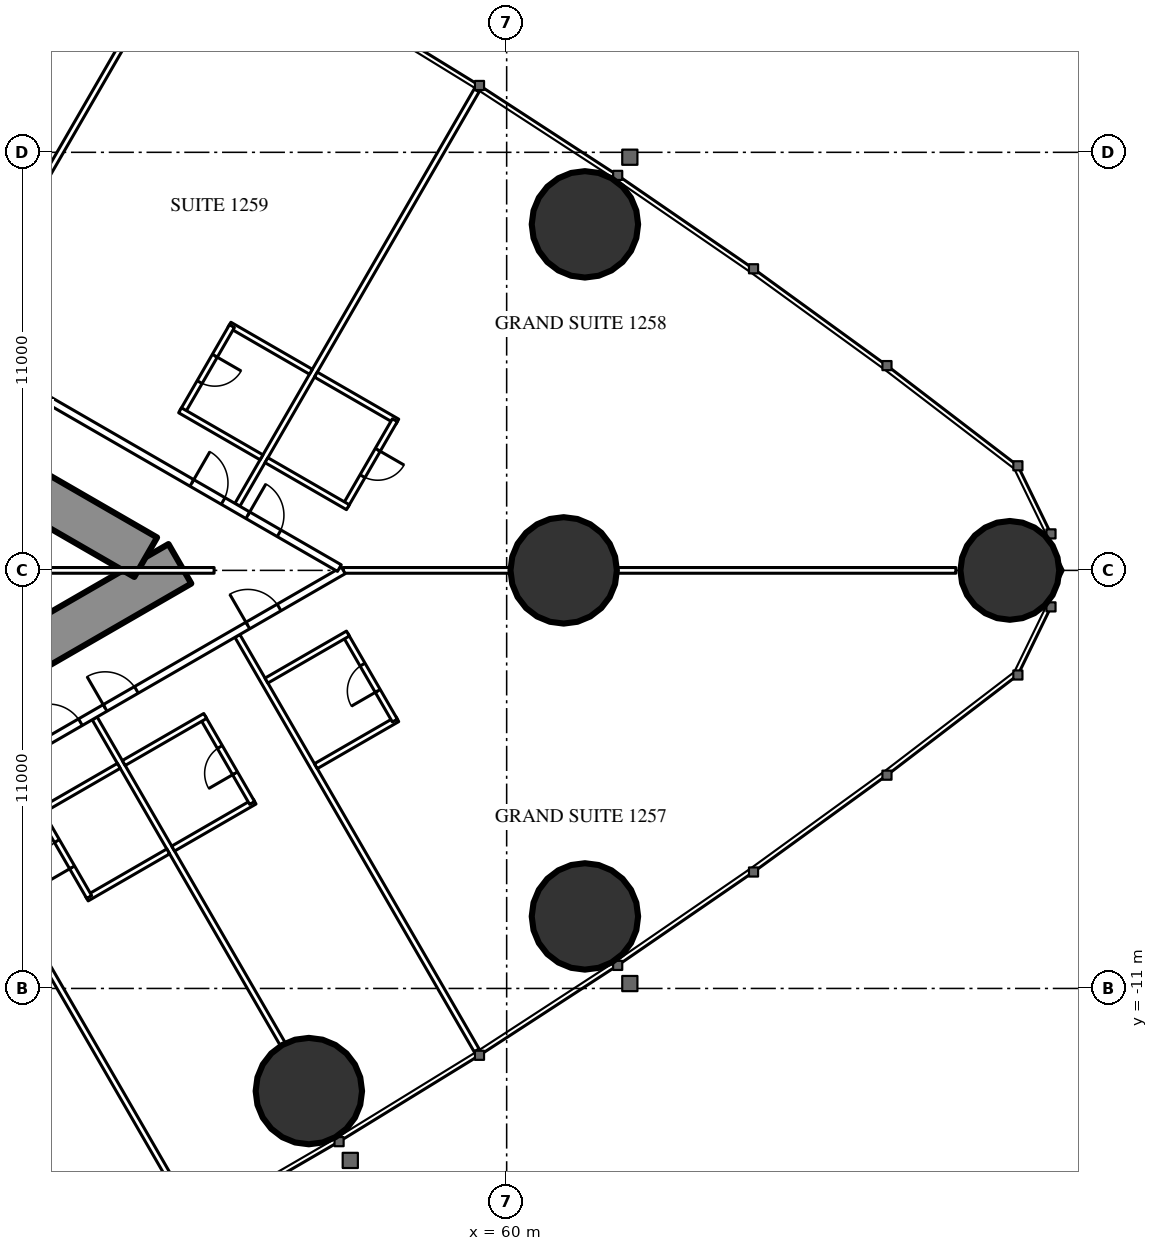
"""IFC4 building model, lengths in metres.
Left out: names, types, materials, properties, quantities, classifications, styles, units other than length and angle.
Written with IfcOpenShell. Run it as: python <this file> out.ifc"""

import sys

from ifc_helpers import new_model, si_unit, direction, frame, frame_2d, origin, origin_2d, place, context, subcontext, project, spatial, rectangle, hollow_circle, extrude, element, fill, save


model = new_model("IFC4")
c1 = context("Model", 3, precision=1e-05, world=origin(), true_north=direction((0.0, 1.0)))
c2 = subcontext(c1, "Body", "Model", "MODEL_VIEW")
j1 = project(units=[si_unit("LENGTHUNIT", "METRE"), si_unit("PLANEANGLEUNIT", "RADIAN")], contexts=[c1])
p1 = place(None, origin())
s1 = spatial("IfcSite", under=j1, at=p1, CompositionType="ELEMENT")
p2 = place(p1, origin())
s2 = spatial("IfcBuilding", under=s1, at=p2, CompositionType="ELEMENT")
p3 = place(p2, frame((0.0, 0.0, 49.5)))
s3 = spatial("IfcBuildingStorey", under=s2, at=p3, CompositionType="ELEMENT", Elevation=49.5)
p4 = place(p3, frame((73.239, 0.0, 0.0), z_axis=(0.0, 0.0, 1.0), x_axis=(1.0, 0.0, 0.0)))
e1 = element("IfcColumn", 1, at=p4, inside=s3, PredefinedType="COLUMN", context=c2, shape_type="SweptSolid", body=[
    extrude(hollow_circle(Radius=1.3, WallThickness=0.1, at=origin_2d()), origin(), (0.0, 0.0, 1.0), 3.5),
])
for number, where, z_axis, x_axis in (
    (2, (62.059, 9.105, 0.0), (0.0, 0.0, 1.0), (1.0, 0.0, 0.0)),
    (3, (54.795, -13.701, 0.0), (0.0, 0.0, 1.0), (1.0, 0.0, 0.0)),
    (4, (62.059, -9.105, 0.0), (0.0, 0.0, 1.0), (1.0, 0.0, 0.0)),
):
    element("IfcColumn", number, at=place(p3, frame(where, z_axis=z_axis, x_axis=x_axis)), inside=s3, PredefinedType="COLUMN", context=c2, shape_type="SweptSolid", body=[
        extrude(hollow_circle(Radius=1.4, WallThickness=0.12, at=origin_2d()), origin(), (0.0, 0.0, 1.0), 3.5),
    ])
p5 = place(p3, frame((61.5, 0.0, 0.0), z_axis=(0.0, 0.0, 1.0), x_axis=(1.0, 0.0, 0.0)))
e5 = element("IfcColumn", 5, at=p5, inside=s3, PredefinedType="COLUMN", context=c2, shape_type="SweptSolid", body=[
    extrude(hollow_circle(Radius=1.4, WallThickness=0.1, at=origin_2d()), origin(), (0.0, 0.0, 1.0), 3.5),
])
p6 = place(p3, frame((27.2, -13.8, 0.0), z_axis=(0.0, 0.0, 1.0), x_axis=(0.866027159892, 0.499996958321, 0.0)))
e6 = element("IfcWall", 6, at=p6, inside=s3, PredefinedType="SHEAR", context=c2, shape_type="SweptSolid", body=[
    extrude(rectangle(XDim=27.947, YDim=1.2, at=frame_2d((13.973, 0.0))), origin(), (0.0, 0.0, 1.0), 3.5),
])
p7 = place(p6, frame((4.6, 0.0, 0.0)))
e7 = element("IfcOpeningElement", 7, at=p7, cuts=e6, PredefinedType="OPENING", context=c2, shape_type="SweptSolid", body=[
    extrude(rectangle(XDim=1.0, YDim=2.2, at=frame_2d((0.5, 1.1))), frame((0.0, 0.61, 0.0), z_axis=(0.0, -1.0, 0.0), x_axis=(1.0, 0.0, 0.0)), (0.0, 0.0, 1.0), 1.22),
])
p8 = place(p6, frame((13.395, 0.0, 0.0)))
e8 = element("IfcOpeningElement", 8, at=p8, cuts=e6, PredefinedType="OPENING", context=c2, shape_type="SweptSolid", body=[
    extrude(rectangle(XDim=1.8, YDim=2.2, at=frame_2d((0.9, 1.1))), frame((0.0, 0.61, 0.0), z_axis=(0.0, -1.0, 0.0), x_axis=(1.0, 0.0, 0.0)), (0.0, 0.0, 1.0), 1.22),
])
p9 = place(p3, frame((27.2, 13.8, 0.0), z_axis=(0.0, 0.0, 1.0), x_axis=(0.866024515034, -0.500001539357, 0.0)))
e9 = element("IfcWall", 9, at=p9, inside=s3, PredefinedType="SHEAR", context=c2, shape_type="SweptSolid", body=[
    extrude(rectangle(XDim=26.907, YDim=1.2, at=frame_2d((13.454, 0.0))), origin(), (0.0, 0.0, 1.0), 3.5),
])
p10 = place(p9, frame((4.6, 0.0, 0.0)))
e10 = element("IfcOpeningElement", 10, at=p10, cuts=e9, PredefinedType="OPENING", context=c2, shape_type="SweptSolid", body=[
    extrude(rectangle(XDim=1.0, YDim=2.2, at=frame_2d((0.5, 1.1))), frame((0.0, 0.61, 0.0), z_axis=(0.0, -1.0, 0.0), x_axis=(1.0, 0.0, 0.0)), (0.0, 0.0, 1.0), 1.22),
])
p11 = place(p9, frame((13.395, 0.0, 0.0)))
e11 = element("IfcOpeningElement", 11, at=p11, cuts=e9, PredefinedType="OPENING", context=c2, shape_type="SweptSolid", body=[
    extrude(rectangle(XDim=1.8, YDim=2.2, at=frame_2d((0.9, 1.1))), frame((0.0, 0.61, 0.0), z_axis=(0.0, -1.0, 0.0), x_axis=(1.0, 0.0, 0.0)), (0.0, 0.0, 1.0), 1.22),
])
p12 = place(p3, frame((45.403, -6.062, 0.0), z_axis=(0.0, 0.0, 1.0), x_axis=(0.500007077968, -0.866021317279, 0.0)))
e12 = element("IfcWall", 12, at=p12, inside=s3, PredefinedType="PARTITIONING", context=c2, shape_type="SweptSolid", body=[
    extrude(rectangle(XDim=12.721, YDim=0.15, at=frame_2d((6.361, 0.0))), origin(), (0.0, 0.0, 1.0), 3.25),
])
p13 = place(p3, frame((49.159, -3.893, 0.0), z_axis=(0.0, 0.0, 1.0), x_axis=(0.499998773722, -0.866026111775, 0.0)))
e13 = element("IfcWall", 13, at=p13, inside=s3, PredefinedType="PARTITIONING", context=c2, shape_type="SweptSolid", body=[
    extrude(rectangle(XDim=9.892, YDim=0.15, at=frame_2d((4.946, 0.0))), origin(), (0.0, 0.0, 1.0), 2.25),
])
p14 = place(p3, frame((52.915, -1.725, 0.0), z_axis=(0.0, 0.0, 1.0), x_axis=(0.499997163113, -0.866027041656, 0.0)))
e14 = element("IfcWall", 14, at=p14, inside=s3, PredefinedType="PARTITIONING", context=c2, shape_type="SweptSolid", body=[
    extrude(rectangle(XDim=12.591, YDim=0.15, at=frame_2d((6.295, 0.0))), origin(), (0.0, 0.0, 1.0), 3.25),
])
p15 = place(p3, frame((45.403, 6.062, 0.0), z_axis=(0.0, 0.0, 1.0), x_axis=(0.500013434677, 0.866017647131, 0.0)))
e15 = element("IfcWall", 15, at=p15, inside=s3, PredefinedType="PARTITIONING", context=c2, shape_type="SweptSolid", body=[
    extrude(rectangle(XDim=9.902, YDim=0.15, at=frame_2d((4.951, 0.0))), origin(), (0.0, 0.0, 1.0), 2.25),
])
p16 = place(p3, frame((52.915, 1.725, 0.0), z_axis=(0.0, 0.0, 1.0), x_axis=(0.499997163113, 0.866027041656, 0.0)))
e16 = element("IfcWall", 16, at=p16, inside=s3, PredefinedType="PARTITIONING", context=c2, shape_type="SweptSolid", body=[
    extrude(rectangle(XDim=12.591, YDim=0.15, at=frame_2d((6.295, 0.0))), origin(), (0.0, 0.0, 1.0), 3.25),
])
p17 = place(p3, frame((55.702, 0.0, 0.0), z_axis=(0.0, 0.0, 1.0), x_axis=(1.0, 0.0, 0.0)))
e17 = element("IfcWall", 17, at=p17, inside=s3, PredefinedType="PARTITIONING", context=c2, shape_type="SweptSolid", body=[
    extrude(rectangle(XDim=16.117, YDim=0.15, at=frame_2d((8.059, 0.0))), origin(), (0.0, 0.0, 1.0), 2.25),
])
p18 = place(p3, frame((37.96, -10.243, 0.0), z_axis=(0.0, 0.0, 1.0), x_axis=(0.866026429433, 0.499998223521, 0.0)))
e18 = element("IfcWall", 18, at=p18, inside=s3, PredefinedType="PARTITIONING", context=c2, shape_type="SweptSolid", body=[
    extrude(rectangle(XDim=20.487, YDim=0.2, at=frame_2d((10.243, 0.0))), origin(), (0.0, 0.0, 1.0), 3.25),
])
p19 = place(p18, frame((6.925, 0.0, 0.0)))
e19 = element("IfcOpeningElement", 19, at=p19, cuts=e18, PredefinedType="OPENING", context=c2, shape_type="SweptSolid", body=[
    extrude(rectangle(XDim=0.95, YDim=2.2, at=frame_2d((0.475, 1.1))), frame((0.0, 0.11, 0.0), z_axis=(0.0, -1.0, 0.0), x_axis=(1.0, 0.0, 0.0)), (0.0, 0.0, 1.0), 0.22),
])
p20 = place(p18, frame((11.549, 0.0, 0.0)))
e20 = element("IfcOpeningElement", 20, at=p20, cuts=e18, PredefinedType="OPENING", context=c2, shape_type="SweptSolid", body=[
    extrude(rectangle(XDim=0.95, YDim=2.2, at=frame_2d((0.475, 1.1))), frame((0.0, 0.11, 0.0), z_axis=(0.0, -1.0, 0.0), x_axis=(1.0, 0.0, 0.0)), (0.0, 0.0, 1.0), 0.22),
])
p21 = place(p18, frame((13.249, 0.0, 0.0)))
e21 = element("IfcOpeningElement", 21, at=p21, cuts=e18, PredefinedType="OPENING", context=c2, shape_type="SweptSolid", body=[
    extrude(rectangle(XDim=0.95, YDim=2.2, at=frame_2d((0.475, 1.1))), frame((0.0, 0.11, 0.0), z_axis=(0.0, -1.0, 0.0), x_axis=(1.0, 0.0, 0.0)), (0.0, 0.0, 1.0), 0.22),
])
p22 = place(p18, frame((17.585, 0.0, 0.0)))
e22 = element("IfcOpeningElement", 22, at=p22, cuts=e18, PredefinedType="OPENING", context=c2, shape_type="SweptSolid", body=[
    extrude(rectangle(XDim=0.95, YDim=2.2, at=frame_2d((0.475, 1.1))), frame((0.0, 0.11, 0.0), z_axis=(0.0, -1.0, 0.0), x_axis=(1.0, 0.0, 0.0)), (0.0, 0.0, 1.0), 0.22),
])
p23 = place(p18, frame((0.6, 0.0, 0.0)))
e23 = element("IfcOpeningElement", 23, at=p23, cuts=e18, PredefinedType="OPENING", context=c2, shape_type="SweptSolid", body=[
    extrude(rectangle(XDim=0.95, YDim=2.2, at=frame_2d((0.475, 1.1))), frame((0.0, 0.11, 0.0), z_axis=(0.0, -1.0, 0.0), x_axis=(1.0, 0.0, 0.0)), (0.0, 0.0, 1.0), 0.22),
])
p24 = place(p3, frame((45.375, 5.963, 0.0), z_axis=(0.0, 0.0, 1.0), x_axis=(0.86603164725, -0.499989185844, 0.0)))
e24 = element("IfcWall", 24, at=p24, inside=s3, PredefinedType="PARTITIONING", context=c2, shape_type="SweptSolid", body=[
    extrude(rectangle(XDim=11.805, YDim=0.2, at=frame_2d((5.903, 0.0))), origin(), (0.0, 0.0, 1.0), 3.25),
])
p25 = place(p24, frame((9.024, 0.0, 0.0)))
e25 = element("IfcOpeningElement", 25, at=p25, cuts=e24, PredefinedType="OPENING", context=c2, shape_type="SweptSolid", body=[
    extrude(rectangle(XDim=0.95, YDim=2.2, at=frame_2d((0.475, 1.1))), frame((0.0, 0.11, 0.0), z_axis=(0.0, -1.0, 0.0), x_axis=(1.0, 0.0, 0.0)), (0.0, 0.0, 1.0), 0.22),
])
p26 = place(p24, frame((7.324, 0.0, 0.0)))
e26 = element("IfcOpeningElement", 26, at=p26, cuts=e24, PredefinedType="OPENING", context=c2, shape_type="SweptSolid", body=[
    extrude(rectangle(XDim=0.95, YDim=2.2, at=frame_2d((0.475, 1.1))), frame((0.0, 0.11, 0.0), z_axis=(0.0, -1.0, 0.0), x_axis=(1.0, 0.0, 0.0)), (0.0, 0.0, 1.0), 0.22),
])
p27 = place(p3, frame((48.951, -8.632, 0.0), z_axis=(0.0, 0.0, 1.0), x_axis=(0.866006523861, 0.500032699561, 0.0)))
e27 = element("IfcWall", 27, at=p27, inside=s3, PredefinedType="PARTITIONING", context=c2, shape_type="SweptSolid", body=[
    extrude(rectangle(XDim=2.475, YDim=0.15, at=frame_2d((1.237, 0.0))), origin(), (0.0, 0.0, 1.0), 3.25),
])
p28 = place(p3, frame((47.716, -6.343, 0.0), z_axis=(0.0, 0.0, 1.0), x_axis=(0.500006934395, -0.866021400173, 0.0)))
e28 = element("IfcWall", 28, at=p28, inside=s3, PredefinedType="PARTITIONING", context=c2, shape_type="SweptSolid", body=[
    extrude(rectangle(XDim=2.6, YDim=0.15, at=frame_2d((1.3, 0.0))), origin(), (0.0, 0.0, 1.0), 3.25),
])
p29 = place(p28, frame((0.9, 0.0, 0.0)))
e29 = element("IfcOpeningElement", 29, at=p29, cuts=e28, PredefinedType="OPENING", context=c2, shape_type="SweptSolid", body=[
    extrude(rectangle(XDim=0.8, YDim=2.2, at=frame_2d((0.4, 1.1))), frame((0.0, 0.085, 0.0), z_axis=(0.0, -1.0, 0.0), x_axis=(1.0, 0.0, 0.0)), (0.0, 0.0, 1.0), 0.17),
])
for number, where, z_axis, x_axis in (
    (30, (47.651, -6.38, 0.0), (0.0, 0.0, 1.0), (0.866, 0.5, 0.0)),
    (31, (51.224, -7.32, 0.0), (0.0, 0.0, 1.0), (0.866, 0.5, 0.0)),
):
    element("IfcWall", number, at=place(p3, frame(where, z_axis=z_axis, x_axis=x_axis)), inside=s3, PredefinedType="PARTITIONING", context=c2, shape_type="SweptSolid", body=[
        extrude(rectangle(XDim=2.475, YDim=0.15, at=frame_2d((1.238, 0.0))), origin(), (0.0, 0.0, 1.0), 3.25),
    ])
p30 = place(p3, frame((52.003, -3.868, 0.0), z_axis=(0.0, 0.0, 1.0), x_axis=(0.500047596559, -0.865997922154, 0.0)))
e32 = element("IfcWall", 32, at=p30, inside=s3, PredefinedType="PARTITIONING", context=c2, shape_type="SweptSolid", body=[
    extrude(rectangle(XDim=2.6, YDim=0.15, at=frame_2d((1.3, 0.0))), origin(), (0.0, 0.0, 1.0), 3.25),
])
p31 = place(p30, frame((0.9, 0.0, 0.0)))
e33 = element("IfcOpeningElement", 33, at=p31, cuts=e32, PredefinedType="OPENING", context=c2, shape_type="SweptSolid", body=[
    extrude(rectangle(XDim=0.8, YDim=2.2, at=frame_2d((0.4, 1.1))), frame((0.0, 0.085, 0.0), z_axis=(0.0, -1.0, 0.0), x_axis=(1.0, 0.0, 0.0)), (0.0, 0.0, 1.0), 0.17),
])
for number, where, z_axis, x_axis in (
    (34, (49.925, -5.068, 0.0), (0.0, 0.0, 1.0), (0.866, 0.5, 0.0)),
    (35, (54.98, -5.151, 0.0), (0.0, 0.0, 1.0), (0.866, 0.5, 0.0)),
):
    element("IfcWall", number, at=place(p3, frame(where, z_axis=z_axis, x_axis=x_axis)), inside=s3, PredefinedType="PARTITIONING", context=c2, shape_type="SweptSolid", body=[
        extrude(rectangle(XDim=2.475, YDim=0.15, at=frame_2d((1.237, 0.0))), origin(), (0.0, 0.0, 1.0), 3.25),
    ])
p32 = place(p3, frame((55.758, -1.7, 0.0), z_axis=(0.0, 0.0, 1.0), x_axis=(0.500006934395, -0.866021400173, 0.0)))
e36 = element("IfcWall", 36, at=p32, inside=s3, PredefinedType="PARTITIONING", context=c2, shape_type="SweptSolid", body=[
    extrude(rectangle(XDim=2.6, YDim=0.15, at=frame_2d((1.3, 0.0))), origin(), (0.0, 0.0, 1.0), 3.25),
])
p33 = place(p32, frame((0.9, 0.0, 0.0)))
e37 = element("IfcOpeningElement", 37, at=p33, cuts=e36, PredefinedType="OPENING", context=c2, shape_type="SweptSolid", body=[
    extrude(rectangle(XDim=0.8, YDim=2.2, at=frame_2d((0.4, 1.1))), frame((0.0, 0.085, 0.0), z_axis=(0.0, -1.0, 0.0), x_axis=(1.0, 0.0, 0.0)), (0.0, 0.0, 1.0), 0.17),
])
for number, where, z_axis, x_axis in (
    (38, (53.68, -2.9, 0.0), (0.0, 0.0, 1.0), (0.866, 0.5, 0.0)),
    (39, (54.98, 5.151, 0.0), (0.0, 0.0, 1.0), (0.866, -0.5, 0.0)),
):
    element("IfcWall", number, at=place(p3, frame(where, z_axis=z_axis, x_axis=x_axis)), inside=s3, PredefinedType="PARTITIONING", context=c2, shape_type="SweptSolid", body=[
        extrude(rectangle(XDim=2.475, YDim=0.15, at=frame_2d((1.237, 0.0))), origin(), (0.0, 0.0, 1.0), 3.25),
    ])
p34 = place(p3, frame((55.758, 1.7, 0.0), z_axis=(0.0, 0.0, 1.0), x_axis=(0.500006934395, 0.866021400173, 0.0)))
e40 = element("IfcWall", 40, at=p34, inside=s3, PredefinedType="PARTITIONING", context=c2, shape_type="SweptSolid", body=[
    extrude(rectangle(XDim=2.6, YDim=0.15, at=frame_2d((1.3, 0.0))), origin(), (0.0, 0.0, 1.0), 3.25),
])
p35 = place(p34, frame((0.9, 0.0, 0.0)))
e41 = element("IfcOpeningElement", 41, at=p35, cuts=e40, PredefinedType="OPENING", context=c2, shape_type="SweptSolid", body=[
    extrude(rectangle(XDim=0.8, YDim=2.2, at=frame_2d((0.4, 1.1))), frame((0.0, 0.085, 0.0), z_axis=(0.0, -1.0, 0.0), x_axis=(1.0, 0.0, 0.0)), (0.0, 0.0, 1.0), 0.17),
])
for number, where, z_axis, x_axis in (
    (42, (53.68, 2.9, 0.0), (0.0, 0.0, 1.0), (0.866, -0.5, 0.0)),
    (43, (52.706, 6.464, 0.0), (0.0, 0.0, 1.0), (0.866, -0.5, 0.0)),
):
    element("IfcWall", number, at=place(p3, frame(where, z_axis=z_axis, x_axis=x_axis)), inside=s3, PredefinedType="PARTITIONING", context=c2, shape_type="SweptSolid", body=[
        extrude(rectangle(XDim=2.475, YDim=0.15, at=frame_2d((1.237, 0.0))), origin(), (0.0, 0.0, 1.0), 3.25),
    ])
p36 = place(p3, frame((51.471, 4.175, 0.0), z_axis=(0.0, 0.0, 1.0), x_axis=(0.500006934395, 0.866021400173, 0.0)))
e44 = element("IfcWall", 44, at=p36, inside=s3, PredefinedType="PARTITIONING", context=c2, shape_type="SweptSolid", body=[
    extrude(rectangle(XDim=2.6, YDim=0.15, at=frame_2d((1.3, 0.0))), origin(), (0.0, 0.0, 1.0), 3.25),
])
p37 = place(p36, frame((0.9, 0.0, 0.0)))
e45 = element("IfcOpeningElement", 45, at=p37, cuts=e44, PredefinedType="OPENING", context=c2, shape_type="SweptSolid", body=[
    extrude(rectangle(XDim=0.8, YDim=2.2, at=frame_2d((0.4, 1.1))), frame((0.0, 0.085, 0.0), z_axis=(0.0, -1.0, 0.0), x_axis=(1.0, 0.0, 0.0)), (0.0, 0.0, 1.0), 0.17),
])
p38 = place(p3, frame((51.406, 4.212, 0.0), z_axis=(0.0, 0.0, 1.0), x_axis=(0.866031185235, -0.4999899861, 0.0)))
e46 = element("IfcWall", 46, at=p38, inside=s3, PredefinedType="PARTITIONING", context=c2, shape_type="SweptSolid", body=[
    extrude(rectangle(XDim=2.475, YDim=0.15, at=frame_2d((1.238, 0.0))), origin(), (0.0, 0.0, 1.0), 3.25),
])
p39 = place(p3, frame((44.575, 0.0, 0.0), z_axis=(0.0, 0.0, 1.0), x_axis=(1.0, 0.0, 0.0)))
e47 = element("IfcWall", 47, at=p39, inside=s3, PredefinedType="PARTITIONING", context=c2, shape_type="SweptSolid", body=[
    extrude(rectangle(XDim=7.727, YDim=0.15, at=frame_2d((3.864, 0.0))), origin(), (0.0, 0.0, 1.0), 2.25),
])
p40 = place(p29, origin())
e48 = element("IfcDoor", 48, at=p40, inside=s3, OperationType="SINGLE_SWING_RIGHT", PredefinedType="DOOR", context=c2, shape_type="SweptSolid", body=[
    extrude(rectangle(XDim=0.8, YDim=2.2, at=frame_2d((0.4, 1.1))), frame((0.0, 0.025, 0.0), z_axis=(0.0, -1.0, 0.0), x_axis=(1.0, 0.0, 0.0)), (0.0, 0.0, 1.0), 0.05),
])
fill(e29, e48)
p41 = place(p20, origin())
e49 = element("IfcDoor", 49, at=p41, inside=s3, OperationType="SINGLE_SWING_LEFT", PredefinedType="DOOR", context=c2, shape_type="SweptSolid", body=[
    extrude(rectangle(XDim=0.95, YDim=2.2, at=frame_2d((0.475, 1.1))), frame((0.0, 0.025, 0.0), z_axis=(0.0, -1.0, 0.0), x_axis=(1.0, 0.0, 0.0)), (0.0, 0.0, 1.0), 0.05),
])
fill(e20, e49)
p42 = place(p31, origin())
e50 = element("IfcDoor", 50, at=p42, inside=s3, OperationType="SINGLE_SWING_RIGHT", PredefinedType="DOOR", context=c2, shape_type="SweptSolid", body=[
    extrude(rectangle(XDim=0.8, YDim=2.2, at=frame_2d((0.4, 1.1))), frame((0.0, 0.025, 0.0), z_axis=(0.0, -1.0, 0.0), x_axis=(1.0, 0.0, 0.0)), (0.0, 0.0, 1.0), 0.05),
])
fill(e33, e50)
p43 = place(p21, origin())
e51 = element("IfcDoor", 51, at=p43, inside=s3, OperationType="SINGLE_SWING_LEFT", PredefinedType="DOOR", context=c2, shape_type="SweptSolid", body=[
    extrude(rectangle(XDim=0.95, YDim=2.2, at=frame_2d((0.475, 1.1))), frame((0.0, 0.025, 0.0), z_axis=(0.0, -1.0, 0.0), x_axis=(1.0, 0.0, 0.0)), (0.0, 0.0, 1.0), 0.05),
])
fill(e21, e51)
p44 = place(p33, origin())
e52 = element("IfcDoor", 52, at=p44, inside=s3, OperationType="SINGLE_SWING_RIGHT", PredefinedType="DOOR", context=c2, shape_type="SweptSolid", body=[
    extrude(rectangle(XDim=0.8, YDim=2.2, at=frame_2d((0.4, 1.1))), frame((0.0, 0.025, 0.0), z_axis=(0.0, -1.0, 0.0), x_axis=(1.0, 0.0, 0.0)), (0.0, 0.0, 1.0), 0.05),
])
fill(e37, e52)
p45 = place(p22, origin())
e53 = element("IfcDoor", 53, at=p45, inside=s3, OperationType="SINGLE_SWING_LEFT", PredefinedType="DOOR", context=c2, shape_type="SweptSolid", body=[
    extrude(rectangle(XDim=0.95, YDim=2.2, at=frame_2d((0.475, 1.1))), frame((0.0, 0.025, 0.0), z_axis=(0.0, -1.0, 0.0), x_axis=(1.0, 0.0, 0.0)), (0.0, 0.0, 1.0), 0.05),
])
fill(e22, e53)
p46 = place(p35, origin())
e54 = element("IfcDoor", 54, at=p46, inside=s3, OperationType="SINGLE_SWING_RIGHT", PredefinedType="DOOR", context=c2, shape_type="SweptSolid", body=[
    extrude(rectangle(XDim=0.8, YDim=2.2, at=frame_2d((0.4, 1.1))), frame((0.0, 0.025, 0.0), z_axis=(0.0, -1.0, 0.0), x_axis=(1.0, 0.0, 0.0)), (0.0, 0.0, 1.0), 0.05),
])
fill(e41, e54)
p47 = place(p25, origin())
e55 = element("IfcDoor", 55, at=p47, inside=s3, OperationType="SINGLE_SWING_LEFT", PredefinedType="DOOR", context=c2, shape_type="SweptSolid", body=[
    extrude(rectangle(XDim=0.95, YDim=2.2, at=frame_2d((0.475, 1.1))), frame((0.0, 0.025, 0.0), z_axis=(0.0, -1.0, 0.0), x_axis=(1.0, 0.0, 0.0)), (0.0, 0.0, 1.0), 0.05),
])
fill(e25, e55)
p48 = place(p37, origin())
e56 = element("IfcDoor", 56, at=p48, inside=s3, OperationType="SINGLE_SWING_RIGHT", PredefinedType="DOOR", context=c2, shape_type="SweptSolid", body=[
    extrude(rectangle(XDim=0.8, YDim=2.2, at=frame_2d((0.4, 1.1))), frame((0.0, 0.025, 0.0), z_axis=(0.0, -1.0, 0.0), x_axis=(1.0, 0.0, 0.0)), (0.0, 0.0, 1.0), 0.05),
])
fill(e45, e56)
p49 = place(p26, origin())
e57 = element("IfcDoor", 57, at=p49, inside=s3, OperationType="SINGLE_SWING_LEFT", PredefinedType="DOOR", context=c2, shape_type="SweptSolid", body=[
    extrude(rectangle(XDim=0.95, YDim=2.2, at=frame_2d((0.475, 1.1))), frame((0.0, 0.025, 0.0), z_axis=(0.0, -1.0, 0.0), x_axis=(1.0, 0.0, 0.0)), (0.0, 0.0, 1.0), 0.05),
])
fill(e26, e57)
save(model, sys.argv[1])
